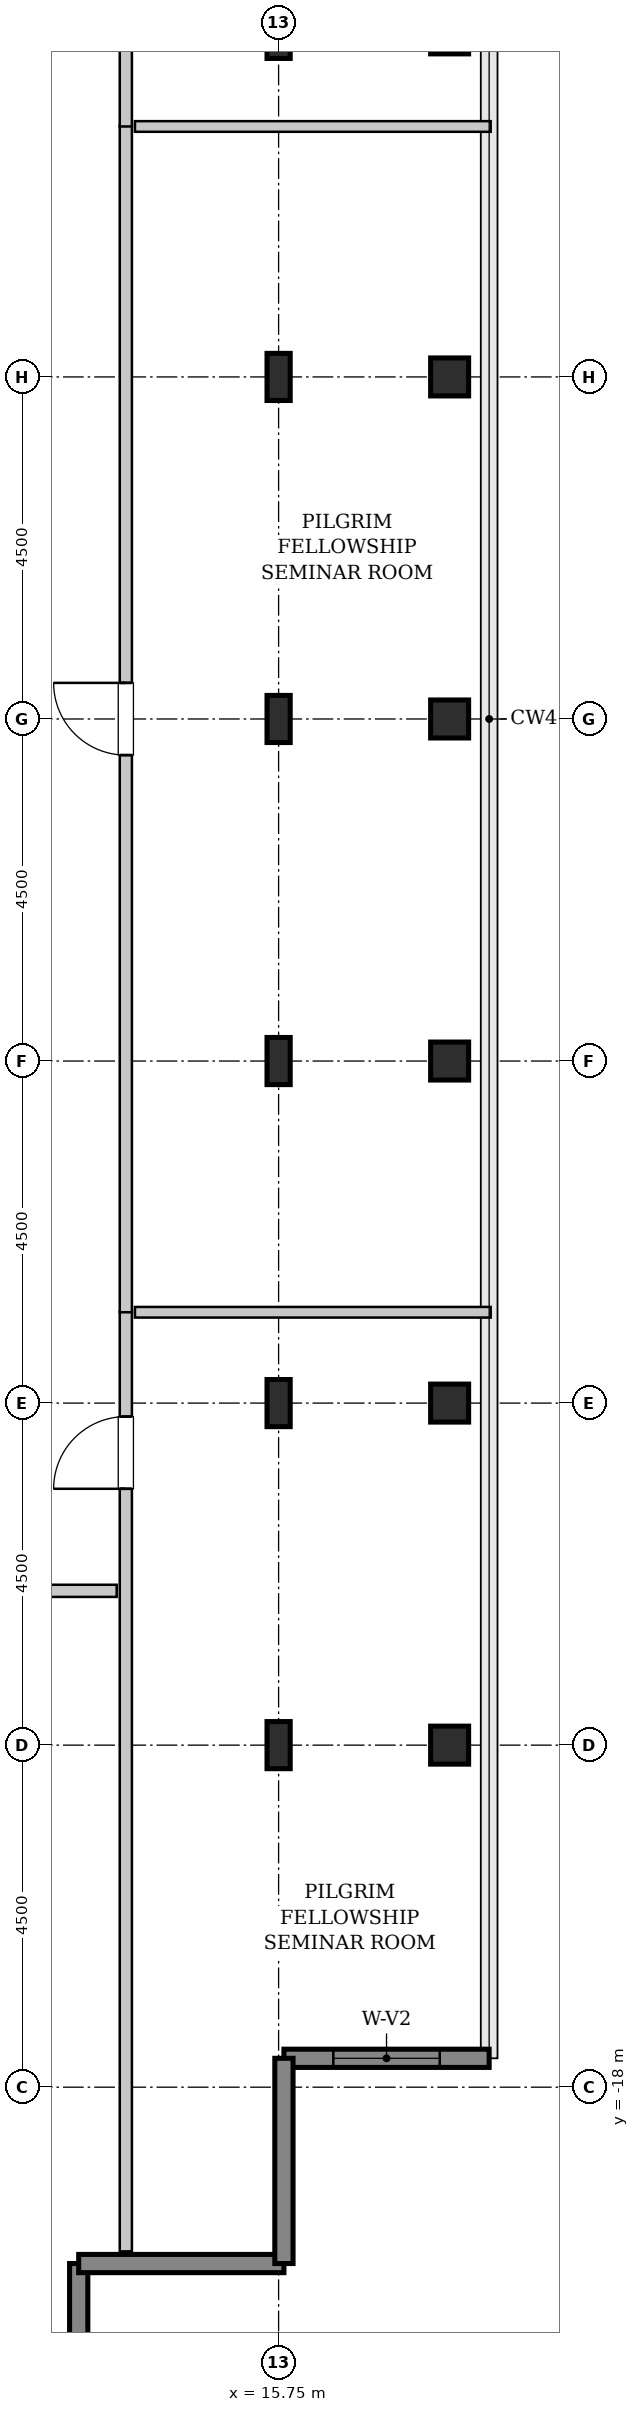
"""IFC4 building model, lengths in metres.
Left out: names, types, materials, properties, quantities, classifications, styles, units other than length and angle.
Written with IfcOpenShell. Run it as: python <this file> out.ifc"""

import sys

from ifc_helpers import new_model, si_unit, direction, frame, frame_2d, origin, origin_2d, place, context, subcontext, project, spatial, rectangle, hollow_rectangle, i_section, extrude, source, transform, mapped, element, fill, save


model = new_model("IFC4")
c1 = context("Model", 3, precision=1e-05, world=origin(), true_north=direction((0.0, 1.0)))
c2 = subcontext(c1, "Body", "Model", "MODEL_VIEW")
j1 = project(units=[si_unit("LENGTHUNIT", "METRE"), si_unit("PLANEANGLEUNIT", "RADIAN")], contexts=[c1])
p1 = place(None, origin())
s1 = spatial("IfcSite", under=j1, at=p1, CompositionType="ELEMENT")
p2 = place(p1, origin())
s2 = spatial("IfcBuilding", under=s1, at=p2, CompositionType="ELEMENT")
p3 = place(p2, frame((0.0, 0.0, 330.0)))
s3 = spatial("IfcBuildingStorey", under=s2, at=p3, CompositionType="ELEMENT", Elevation=330.0)
m1 = source(origin(), c2, "Body", "SweptSolid", [
    extrude(i_section(OverallWidth=0.305, OverallDepth=0.62, WebThickness=0.021, FlangeThickness=0.04, FilletRadius=0.027, at=origin_2d()), origin(), (0.0, 0.0, 1.0), 3.8),
])
for number, where, z_axis, x_axis in (
    (1, (15.75, -13.5, 0.0), (0.0, 0.0, 1.0), (1.0, 0.0, 0.0)),
    (2, (15.75, -9.0, 0.0), (0.0, 0.0, 1.0), (1.0, 0.0, 0.0)),
    (3, (15.75, -4.5, 0.0), (0.0, 0.0, 1.0), (1.0, 0.0, 0.0)),
    (4, (15.75, 0.0, 0.0), (0.0, 0.0, 1.0), (1.0, 0.0, 0.0)),
    (5, (15.75, 4.5, 0.0), (0.0, 0.0, 1.0), (1.0, 0.0, 0.0)),
    (6, (15.75, 9.0, 0.0), (0.0, 0.0, 1.0), (1.0, 0.0, 0.0)),
):
    element("IfcColumn", number, at=place(p3, frame(where, z_axis=z_axis, x_axis=x_axis)), inside=s3, PredefinedType="COLUMN", context=c2, shape_type="MappedRepresentation", body=[
        mapped(m1, transform((0.0, 0.0, 0.0), x_axis=(1.0, 0.0, 0.0), y_axis=(0.0, 1.0, 0.0), z_axis=(0.0, 0.0, 1.0), scale=1.0)),
    ])
m2 = source(origin(), c2, "Body", "SweptSolid", [
    extrude(hollow_rectangle(XDim=0.5, YDim=0.5, WallThickness=0.025, InnerFilletRadius=0.025, OuterFilletRadius=0.05, at=origin_2d()), origin(), (0.0, 0.0, 1.0), 3.8),
])
for number, where, z_axis, x_axis in (
    (7, (18.0, -13.5, 0.0), (0.0, 0.0, 1.0), (1.0, 0.0, 0.0)),
    (8, (18.0, -9.0, 0.0), (0.0, 0.0, 1.0), (1.0, 0.0, 0.0)),
    (9, (18.0, -4.5, 0.0), (0.0, 0.0, 1.0), (1.0, 0.0, 0.0)),
    (10, (18.0, 0.0, 0.0), (0.0, 0.0, 1.0), (1.0, 0.0, 0.0)),
    (11, (18.0, 4.5, 0.0), (0.0, 0.0, 1.0), (1.0, 0.0, 0.0)),
    (12, (18.0, 9.0, 0.0), (0.0, 0.0, 1.0), (1.0, 0.0, 0.0)),
):
    element("IfcColumn", number, at=place(p3, frame(where, z_axis=z_axis, x_axis=x_axis)), inside=s3, PredefinedType="COLUMN", context=c2, shape_type="MappedRepresentation", body=[
        mapped(m2, transform((0.0, 0.0, 0.0), x_axis=(1.0, 0.0, 0.0), y_axis=(0.0, 1.0, 0.0), z_axis=(0.0, 0.0, 1.0), scale=1.0)),
    ])
m3 = source(origin(), c2, "Body", "SweptSolid", [
    extrude(rectangle(XDim=2.7, YDim=0.24, at=frame_2d((1.35, 0.0))), origin(), (0.0, 0.0, 1.0), 3.55),
])
p4 = place(p3, frame((15.82, -17.62, 0.0), z_axis=(0.0, 0.0, 1.0), x_axis=(1.0, 0.0, 0.0)))
e13 = element("IfcWall", 13, at=p4, inside=s3, PredefinedType="SHEAR", context=c2, shape_type="MappedRepresentation", body=[
    mapped(m3, transform((0.0, 0.0, 0.0), x_axis=(1.0, 0.0, 0.0), y_axis=(0.0, 1.0, 0.0), z_axis=(0.0, 0.0, 1.0), scale=1.0)),
])
p5 = place(p4, frame((0.65, 0.0, 0.85)))
e14 = element("IfcOpeningElement", 14, at=p5, cuts=e13, PredefinedType="OPENING", context=c2, shape_type="SweptSolid", body=[
    extrude(rectangle(XDim=1.4, YDim=1.8, at=frame_2d((0.7, 0.9))), frame((0.0, 0.13, 0.0), z_axis=(0.0, -1.0, 0.0), x_axis=(1.0, 0.0, 0.0)), (0.0, 0.0, 1.0), 0.26),
])
for number, where, z_axis, x_axis in (
    (15, (13.12, -23.02, 0.0), (0.0, 0.0, 1.0), (0.0, 1.0, 0.0)),
    (16, (13.12, -20.32, 0.0), (0.0, 0.0, 1.0), (1.0, 0.0, 0.0)),
    (17, (15.82, -20.32, 0.0), (0.0, 0.0, 1.0), (0.0, 1.0, 0.0)),
):
    element("IfcWall", number, at=place(p3, frame(where, z_axis=z_axis, x_axis=x_axis)), inside=s3, PredefinedType="SHEAR", context=c2, shape_type="MappedRepresentation", body=[
        mapped(m3, transform((0.0, 0.0, 0.0), x_axis=(1.0, 0.0, 0.0), y_axis=(0.0, 1.0, 0.0), z_axis=(0.0, 0.0, 1.0), scale=1.0)),
    ])
m4 = source(origin(), c2, "Body", "SweptSolid", [
    extrude(rectangle(XDim=12.365, YDim=0.16, at=frame_2d((6.183, 0.0))), origin(), (0.0, 0.0, 1.0), 3.535),
])
p6 = place(p3, frame((13.74, -20.16, 0.0), z_axis=(0.0, 0.0, 1.0), x_axis=(0.0, 1.0, 0.0)))
e18 = element("IfcWall", 18, at=p6, inside=s3, PredefinedType="PARTITIONING", context=c2, shape_type="MappedRepresentation", body=[
    mapped(m4, transform((0.0, 0.0, 0.0), x_axis=(1.0, 0.0, 0.0), y_axis=(0.0, 1.0, 0.0), z_axis=(0.0, 0.0, 1.0), scale=1.0)),
])
p7 = place(p6, frame((10.032, 0.0, 0.0)))
e19 = element("IfcOpeningElement", 19, at=p7, cuts=e18, PredefinedType="OPENING", context=c2, shape_type="SweptSolid", body=[
    extrude(rectangle(XDim=0.95, YDim=2.1, at=frame_2d((0.475, 1.05))), frame((0.0, 0.09, 0.0), z_axis=(0.0, -1.0, 0.0), x_axis=(1.0, 0.0, 0.0)), (0.0, 0.0, 1.0), 0.18),
])
m5 = source(origin(), c2, "Body", "SweptSolid", [
    extrude(rectangle(XDim=4.68, YDim=0.14, at=frame_2d((2.34, 0.0))), origin(), (0.0, 0.0, 1.0), 3.535),
])
p8 = place(p3, frame((13.86, -7.805, 0.0), z_axis=(0.0, 0.0, 1.0), x_axis=(1.0, 0.0, 0.0)))
e20 = element("IfcWall", 20, at=p8, inside=s3, PredefinedType="PARTITIONING", context=c2, shape_type="MappedRepresentation", body=[
    mapped(m5, transform((0.0, 0.0, 0.0), x_axis=(1.0, 0.0, 0.0), y_axis=(0.0, 1.0, 0.0), z_axis=(0.0, 0.0, 1.0), scale=1.0)),
])
m6 = source(origin(), c2, "Body", "SweptSolid", [
    extrude(rectangle(XDim=15.61, YDim=0.16, at=frame_2d((7.805, 0.0))), origin(), (0.0, 0.0, 1.0), 3.535),
])
p9 = place(p3, frame((13.74, -7.805, 0.0), z_axis=(0.0, 0.0, 1.0), x_axis=(0.0, 1.0, 0.0)))
e21 = element("IfcWall", 21, at=p9, inside=s3, PredefinedType="PARTITIONING", context=c2, shape_type="MappedRepresentation", body=[
    mapped(m6, transform((0.0, 0.0, 0.0), x_axis=(1.0, 0.0, 0.0), y_axis=(0.0, 1.0, 0.0), z_axis=(0.0, 0.0, 1.0), scale=1.0)),
])
p10 = place(p9, frame((7.33, 0.0, 0.0)))
e22 = element("IfcOpeningElement", 22, at=p10, cuts=e21, PredefinedType="OPENING", context=c2, shape_type="SweptSolid", body=[
    extrude(rectangle(XDim=0.95, YDim=2.1, at=frame_2d((0.475, 1.05))), frame((0.0, 0.09, 0.0), z_axis=(0.0, -1.0, 0.0), x_axis=(1.0, 0.0, 0.0)), (0.0, 0.0, 1.0), 0.18),
])
p11 = place(p3, frame((13.86, 7.795, 0.0), z_axis=(0.0, 0.0, 1.0), x_axis=(1.0, 0.0, 0.0)))
e23 = element("IfcWall", 23, at=p11, inside=s3, PredefinedType="PARTITIONING", context=c2, shape_type="MappedRepresentation", body=[
    mapped(m5, transform((0.0, 0.0, 0.0), x_axis=(1.0, 0.0, 0.0), y_axis=(0.0, 1.0, 0.0), z_axis=(0.0, 0.0, 1.0), scale=1.0)),
])
p12 = place(p3, frame((13.74, 7.795, 0.0), z_axis=(0.0, 0.0, 1.0), x_axis=(0.0, 1.0, 0.0)))
e24 = element("IfcWall", 24, at=p12, inside=s3, PredefinedType="PARTITIONING", context=c2, shape_type="MappedRepresentation", body=[
    mapped(m4, transform((0.0, 0.0, 0.0), x_axis=(1.0, 0.0, 0.0), y_axis=(0.0, 1.0, 0.0), z_axis=(0.0, 0.0, 1.0), scale=1.0)),
])
p13 = place(p12, frame((1.383, 0.0, 0.0)))
e25 = element("IfcOpeningElement", 25, at=p13, cuts=e24, PredefinedType="OPENING", context=c2, shape_type="SweptSolid", body=[
    extrude(rectangle(XDim=0.95, YDim=2.1, at=frame_2d((0.475, 1.05))), frame((0.0, 0.09, 0.0), z_axis=(0.0, -1.0, 0.0), x_axis=(1.0, 0.0, 0.0)), (0.0, 0.0, 1.0), 0.18),
])
m7 = source(origin(), c2, "Body", "SweptSolid", [
    extrude(rectangle(XDim=8.36, YDim=0.16, at=frame_2d((4.18, 0.0))), origin(), (0.0, 0.0, 1.0), 3.535),
])
p14 = place(p3, frame((5.26, -11.47, 0.0), z_axis=(0.0, 0.0, 1.0), x_axis=(1.0, 0.0, 0.0)))
e26 = element("IfcWall", 26, at=p14, inside=s3, PredefinedType="PARTITIONING", context=c2, shape_type="MappedRepresentation", body=[
    mapped(m7, transform((0.0, 0.0, 0.0), x_axis=(1.0, 0.0, 0.0), y_axis=(0.0, 1.0, 0.0), z_axis=(0.0, 0.0, 1.0), scale=1.0)),
])
p15 = place(p14, frame((3.705, 0.0, 0.0)))
e27 = element("IfcOpeningElement", 27, at=p15, cuts=e26, PredefinedType="OPENING", context=c2, shape_type="SweptSolid", body=[
    extrude(rectangle(XDim=0.95, YDim=2.1, at=frame_2d((0.475, 1.05))), frame((0.0, 0.09, 0.0), z_axis=(0.0, -1.0, 0.0), x_axis=(1.0, 0.0, 0.0)), (0.0, 0.0, 1.0), 0.18),
])
m8 = source(origin(), c2, "Body", "SweptSolid", [
    extrude(rectangle(XDim=1.4, YDim=1.8, at=frame_2d((0.7, 0.9))), frame((0.0, 0.03, 0.0), z_axis=(0.0, -1.0, 0.0), x_axis=(1.0, 0.0, 0.0)), (0.0, 0.0, 1.0), 0.06),
])
p16 = place(p5, origin())
e28 = element("IfcWindow", 28, at=p16, inside=s3, PartitioningType="SINGLE_PANEL", PredefinedType="WINDOW", context=c2, shape_type="MappedRepresentation", body=[
    mapped(m8, transform((0.0, 0.0, 0.0), x_axis=(1.0, 0.0, 0.0), y_axis=(0.0, 1.0, 0.0), z_axis=(0.0, 0.0, 1.0), scale=1.0)),
])
fill(e14, e28)
m9 = source(origin(), c2, "Body", "SweptSolid", [
    extrude(rectangle(XDim=0.95, YDim=2.1, at=frame_2d((0.475, 1.05))), frame((0.0, 0.025, 0.0), z_axis=(0.0, -1.0, 0.0), x_axis=(1.0, 0.0, 0.0)), (0.0, 0.0, 1.0), 0.05),
])
p17 = place(p7, origin())
e29 = element("IfcDoor", 29, at=p17, inside=s3, OperationType="SINGLE_SWING_LEFT", PredefinedType="DOOR", context=c2, shape_type="MappedRepresentation", body=[
    mapped(m9, transform((0.0, 0.0, 0.0), x_axis=(1.0, 0.0, 0.0), y_axis=(0.0, 1.0, 0.0), z_axis=(0.0, 0.0, 1.0), scale=1.0)),
])
fill(e19, e29)
p18 = place(p10, origin())
e30 = element("IfcDoor", 30, at=p18, inside=s3, OperationType="SINGLE_SWING_RIGHT", PredefinedType="DOOR", context=c2, shape_type="MappedRepresentation", body=[
    mapped(m9, transform((0.0, 0.0, 0.0), x_axis=(1.0, 0.0, 0.0), y_axis=(0.0, 1.0, 0.0), z_axis=(0.0, 0.0, 1.0), scale=1.0)),
])
fill(e22, e30)
save(model, sys.argv[1])
